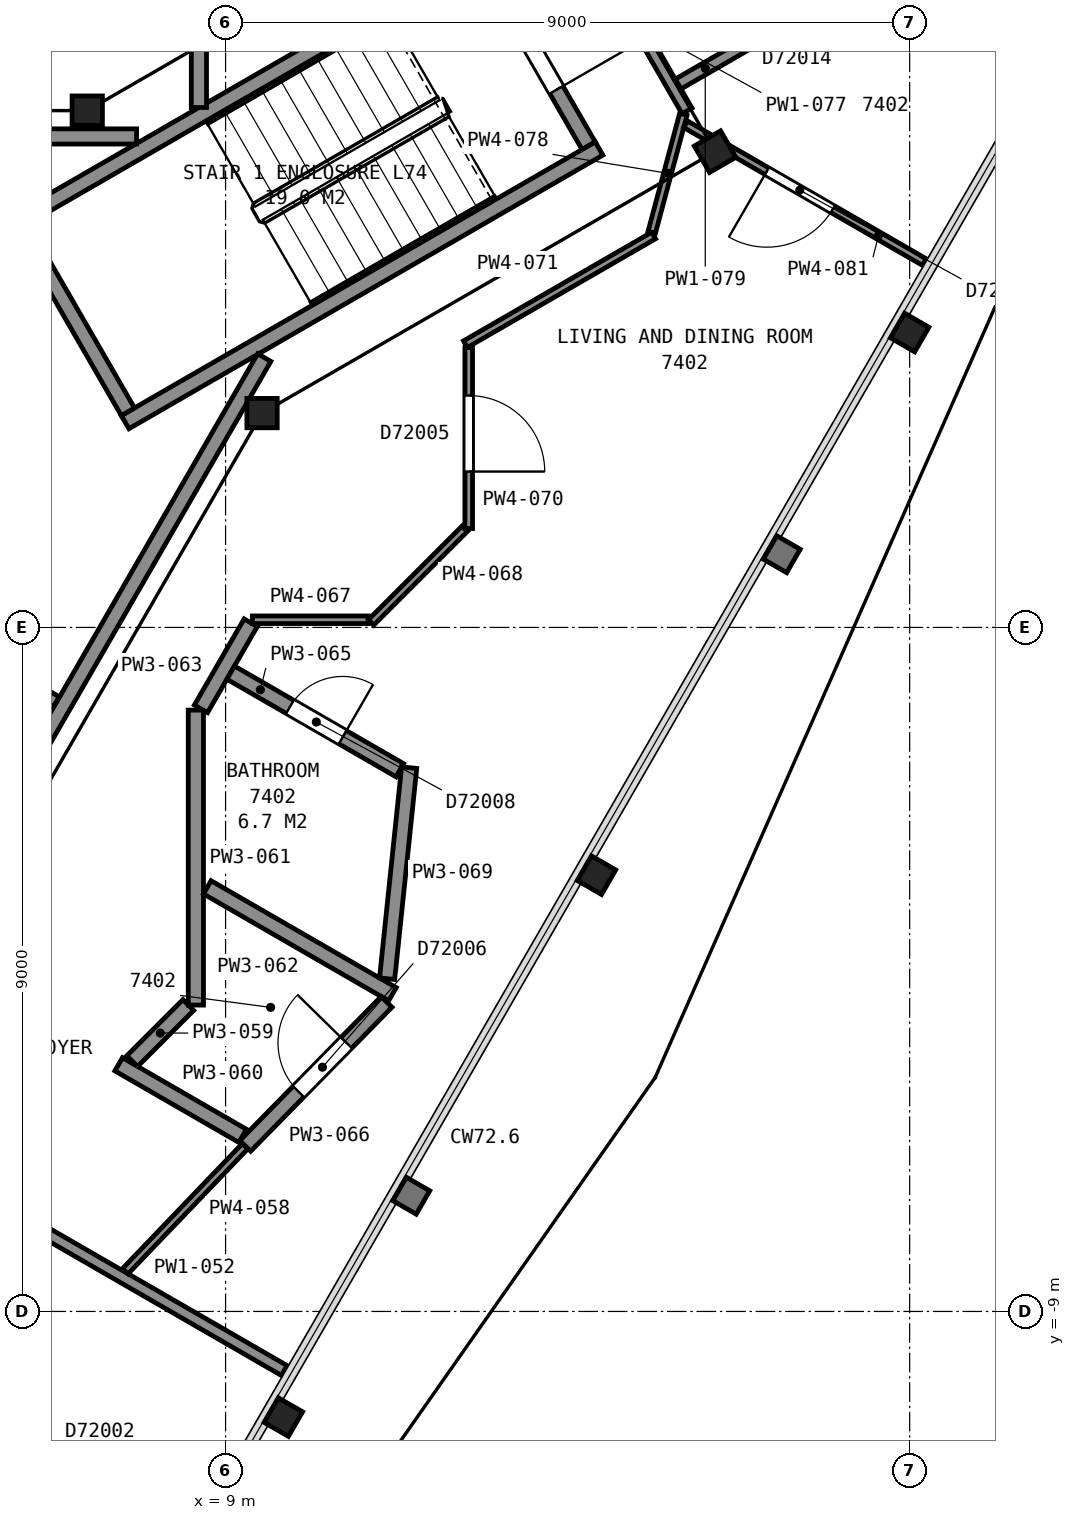
"""IFC4 building model, lengths in metres.
Left out: names, types, materials, properties, quantities, classifications, styles, units other than length and angle.
Written with IfcOpenShell. Run it as: python <this file> out.ifc"""

import sys

from ifc_helpers import new_model, si_unit, direction, frame, frame_2d, origin, origin_2d, place, context, subcontext, project, spatial, rectangle, i_section, extrude, element, fill, save


model = new_model("IFC4")
c1 = context("Model", 3, precision=1e-05, world=origin(), true_north=direction((0.0, 1.0)))
c2 = subcontext(c1, "Body", "Model", "MODEL_VIEW")
j1 = project(units=[si_unit("LENGTHUNIT", "METRE"), si_unit("PLANEANGLEUNIT", "RADIAN")], contexts=[c1])
p1 = place(None, origin())
s1 = spatial("IfcSite", under=j1, at=p1, CompositionType="ELEMENT")
p2 = place(p1, origin())
s2 = spatial("IfcBuilding", under=s1, at=p2, CompositionType="ELEMENT")
p3 = place(p2, frame((0.0, 0.0, 293.6)))
s3 = spatial("IfcBuildingStorey", under=s2, at=p3, CompositionType="ELEMENT", Elevation=293.6)
for number, where, z_axis, x_axis in (
    (1, (9.76, -10.39, 0.0), (0.0, 0.0, 1.0), (-0.5, -0.866, 0.0)),
    (2, (13.88, -3.26, 0.0), (0.0, 0.0, 1.0), (-0.5, -0.866, 0.0)),
    (3, (18.0, 3.88, 0.0), (0.0, 0.0, 1.0), (-0.5, -0.866, 0.0)),
):
    element("IfcColumn", number, at=place(p3, frame(where, z_axis=z_axis, x_axis=x_axis)), inside=s3, PredefinedType="COLUMN", context=c2, shape_type="SweptSolid", body=[
        extrude(i_section(OverallWidth=0.373, OverallDepth=0.368, WebThickness=0.015, FlangeThickness=0.024, FilletRadius=0.015, at=origin_2d()), origin(), (0.0, 0.0, 1.0), 3.7),
    ])
p4 = place(p3, frame((9.48, 2.82, 0.0), z_axis=(0.0, 0.0, 1.0), x_axis=(1.0, 0.0, 0.0)))
e4 = element("IfcColumn", 4, at=p4, inside=s3, PredefinedType="COLUMN", context=c2, shape_type="SweptSolid", body=[
    extrude(i_section(OverallWidth=0.399, OverallDepth=0.386, WebThickness=0.021, FlangeThickness=0.033, FilletRadius=0.015, at=origin_2d()), origin(), (0.0, 0.0, 1.0), 3.7),
])
p5 = place(p3, frame((15.44, 6.26, 0.0), z_axis=(0.0, 0.0, 1.0), x_axis=(0.5, -0.866025403784, 0.0)))
e5 = element("IfcColumn", 5, at=p5, inside=s3, PredefinedType="COLUMN", context=c2, shape_type="SweptSolid", body=[
    extrude(i_section(OverallWidth=0.401, OverallDepth=0.399, WebThickness=0.025, FlangeThickness=0.04, FilletRadius=0.015, at=origin_2d()), origin(), (0.0, 0.0, 1.0), 3.7),
])
p6 = place(p3, frame((7.18, 6.8, 0.0), z_axis=(0.0, 0.0, 1.0), x_axis=(1.0, 0.0, 0.0)))
e6 = element("IfcColumn", 6, at=p6, inside=s3, PredefinedType="COLUMN", context=c2, shape_type="SweptSolid", body=[
    extrude(i_section(OverallWidth=0.399, OverallDepth=0.386, WebThickness=0.021, FlangeThickness=0.033, FilletRadius=0.015, at=origin_2d()), origin(), (0.0, 0.0, 1.0), 3.7),
])
p7 = place(p3, frame((13.777, 6.338, 0.0), z_axis=(0.0, 0.0, 1.0), x_axis=(-0.500049511043, 0.865996816683, 0.0)))
e7 = element("IfcWall", 7, at=p7, inside=s3, PredefinedType="PARTITIONING", context=c2, shape_type="SweptSolid", body=[
    extrude(rectangle(XDim=2.8, YDim=0.2, at=frame_2d((1.4, 0.0))), origin(), (0.0, 0.0, 1.0), 3.45),
])
p8 = place(p7, frame((0.85, 0.0, 0.0)))
e8 = element("IfcOpeningElement", 8, at=p8, cuts=e7, PredefinedType="OPENING", context=c2, shape_type="SweptSolid", body=[
    extrude(rectangle(XDim=1.1, YDim=2.1, at=frame_2d((0.55, 1.05))), frame((0.0, 0.11, 0.0), z_axis=(0.0, -1.0, 0.0), x_axis=(1.0, 0.0, 0.0)), (0.0, 0.0, 1.0), 0.22),
])
for number, where, z_axis, x_axis in (
    (9, (6.178, 5.299, 0.0), (0.0, 0.0, 1.0), (0.866, 0.5, 0.0)),
    (10, (7.678, 2.701, 0.0), (0.0, 0.0, 1.0), (0.866, 0.5, 0.0)),
):
    element("IfcWall", number, at=place(p3, frame(where, z_axis=z_axis, x_axis=x_axis)), inside=s3, PredefinedType="PARTITIONING", context=c2, shape_type="SweptSolid", body=[
        extrude(rectangle(XDim=7.2, YDim=0.2, at=frame_2d((3.6, 0.0))), origin(), (0.0, 0.0, 1.0), 3.45),
    ])
p9 = place(p3, frame((7.715, 2.838, 0.0), z_axis=(0.0, 0.0, 1.0), x_axis=(-0.500049511043, 0.865996816683, 0.0)))
e11 = element("IfcWall", 11, at=p9, inside=s3, PredefinedType="PARTITIONING", context=c2, shape_type="SweptSolid", body=[
    extrude(rectangle(XDim=2.8, YDim=0.2, at=frame_2d((1.4, 0.0))), origin(), (0.0, 0.0, 1.0), 3.45),
])
p10 = place(p3, frame((7.829, 6.46, 0.0), z_axis=(0.0, 0.0, 1.0), x_axis=(-1.0, 0.0, 0.0)))
e12 = element("IfcWall", 12, at=p10, inside=s3, PredefinedType="PARTITIONING", context=c2, shape_type="SweptSolid", body=[
    extrude(rectangle(XDim=15.658, YDim=0.2, at=frame_2d((7.829, 0.0))), origin(), (0.0, 0.0, 1.0), 3.45),
])
p11 = place(p10, frame((12.168, 0.0, 0.0)))
e13 = element("IfcOpeningElement", 13, at=p11, cuts=e12, PredefinedType="OPENING", context=c2, shape_type="SweptSolid", body=[
    extrude(rectangle(XDim=1.2, YDim=2.1, at=frame_2d((0.6, 1.05))), frame((0.0, 0.11, 0.0), z_axis=(0.0, -1.0, 0.0), x_axis=(1.0, 0.0, 0.0)), (0.0, 0.0, 1.0), 0.22),
])
p12 = place(p3, frame((3.828, -6.29, 0.0), z_axis=(0.0, 0.0, 1.0), x_axis=(0.499979739078, 0.866037101117, 0.0)))
e14 = element("IfcWall", 14, at=p12, inside=s3, PredefinedType="PARTITIONING", context=c2, shape_type="SweptSolid", body=[
    extrude(rectangle(XDim=11.363, YDim=0.2, at=frame_2d((5.681, 0.0))), origin(), (0.0, 0.0, 1.0), 3.45),
])
p13 = place(p12, frame((0.55, 0.0, 0.0)))
e15 = element("IfcOpeningElement", 15, at=p13, cuts=e14, PredefinedType="OPENING", context=c2, shape_type="SweptSolid", body=[
    extrude(rectangle(XDim=1.2, YDim=2.1, at=frame_2d((0.6, 1.05))), frame((0.0, 0.11, 0.0), z_axis=(0.0, -1.0, 0.0), x_axis=(1.0, 0.0, 0.0)), (0.0, 0.0, 1.0), 0.22),
])
p14 = place(p3, frame((6.774, -0.978, 0.0), z_axis=(0.0, 0.0, 1.0), x_axis=(-0.866062920605, 0.499935013329, 0.0)))
e16 = element("IfcWall", 16, at=p14, inside=s3, PredefinedType="PARTITIONING", context=c2, shape_type="SweptSolid", body=[
    extrude(rectangle(XDim=2.22, YDim=0.15, at=frame_2d((1.11, 0.0))), origin(), (0.0, 0.0, 1.0), 3.45),
])
p15 = place(p14, frame((0.646, 0.0, 0.0)))
e17 = element("IfcOpeningElement", 17, at=p15, cuts=e16, PredefinedType="OPENING", context=c2, shape_type="SweptSolid", body=[
    extrude(rectangle(XDim=0.9, YDim=2.1, at=frame_2d((0.45, 1.05))), frame((0.0, 0.085, 0.0), z_axis=(0.0, -1.0, 0.0), x_axis=(1.0, 0.0, 0.0)), (0.0, 0.0, 1.0), 0.17),
])
p16 = place(p3, frame((3.682, -9.495, 0.0), z_axis=(0.0, 0.0, 1.0), x_axis=(0.866046690806, -0.499963127985, 0.0)))
e18 = element("IfcWall", 18, at=p16, inside=s3, PredefinedType="PARTITIONING", context=c2, shape_type="SweptSolid", body=[
    extrude(rectangle(XDim=3.454, YDim=0.2, at=frame_2d((1.727, 0.0))), origin(), (0.0, 0.0, 1.0), 2.723),
])
p17 = place(p3, frame((9.772, -9.777, 0.0), z_axis=(0.0, 0.0, 1.0), x_axis=(-0.866083818164, 0.499898809675, 0.0)))
e19 = element("IfcWall", 19, at=p17, inside=s3, PredefinedType="PARTITIONING", context=c2, shape_type="SweptSolid", body=[
    extrude(rectangle(XDim=6.551, YDim=0.15, at=frame_2d((3.275, 0.0))), origin(), (0.0, 0.0, 1.0), 2.723),
])
p18 = place(p17, frame((4.001, 0.0, 0.0)))
e20 = element("IfcOpeningElement", 20, at=p18, cuts=e19, PredefinedType="OPENING", context=c2, shape_type="SweptSolid", body=[
    extrude(rectangle(XDim=1.0, YDim=2.1, at=frame_2d((0.5, 1.05))), frame((0.0, 0.085, 0.0), z_axis=(0.0, -1.0, 0.0), x_axis=(1.0, 0.0, 0.0)), (0.0, 0.0, 1.0), 0.17),
])
p19 = place(p3, frame((7.681, -8.47, 0.0), z_axis=(0.0, 0.0, 1.0), x_axis=(0.691774963189, 0.722113149239, 0.0)))
e21 = element("IfcWall", 21, at=p19, inside=s3, PredefinedType="PARTITIONING", context=c2, shape_type="SweptSolid", body=[
    extrude(rectangle(XDim=2.277, YDim=0.1, at=frame_2d((1.139, 0.0))), origin(), (0.0, 0.0, 1.0), 2.723),
])
p20 = place(p3, frame((7.772, -5.706, 0.0), z_axis=(0.0, 0.0, 1.0), x_axis=(0.707106781187, 0.707106781187, 0.0)))
e22 = element("IfcWall", 22, at=p20, inside=s3, PredefinedType="PARTITIONING", context=c2, shape_type="SweptSolid", body=[
    extrude(rectangle(XDim=1.044, YDim=0.2, at=frame_2d((0.522, 0.0))), origin(), (0.0, 0.0, 1.0), 2.723),
])
p21 = place(p3, frame((7.594, -5.748, 0.0), z_axis=(0.0, 0.0, 1.0), x_axis=(0.866049635583, -0.499958026946, 0.0)))
e23 = element("IfcWall", 23, at=p21, inside=s3, PredefinedType="PARTITIONING", context=c2, shape_type="SweptSolid", body=[
    extrude(rectangle(XDim=1.884, YDim=0.2, at=frame_2d((0.942, 0.0))), origin(), (0.0, 0.0, 1.0), 2.723),
])
p22 = place(p3, frame((8.609, -4.969, 0.0), z_axis=(0.0, 0.0, 1.0), x_axis=(0.0, 1.0, 0.0)))
e24 = element("IfcWall", 24, at=p22, inside=s3, PredefinedType="PARTITIONING", context=c2, shape_type="SweptSolid", body=[
    extrude(rectangle(XDim=3.881, YDim=0.2, at=frame_2d((1.94, 0.0))), origin(), (0.0, 0.0, 1.0), 2.723),
])
p23 = place(p3, frame((8.759, -3.42, 0.0), z_axis=(0.0, 0.0, 1.0), x_axis=(0.866098885879, -0.499872703674, 0.0)))
e25 = element("IfcWall", 25, at=p23, inside=s3, PredefinedType="PARTITIONING", context=c2, shape_type="SweptSolid", body=[
    extrude(rectangle(XDim=2.813, YDim=0.2, at=frame_2d((1.407, 0.0))), origin(), (0.0, 0.0, 1.0), 2.723),
])
p24 = place(p3, frame((8.677, -1.071, 0.0), z_axis=(0.0, 0.0, 1.0), x_axis=(0.49993245451, 0.866064397679, 0.0)))
e26 = element("IfcWall", 26, at=p24, inside=s3, PredefinedType="PARTITIONING", context=c2, shape_type="SweptSolid", body=[
    extrude(rectangle(XDim=1.308, YDim=0.2, at=frame_2d((0.654, 0.0))), origin(), (0.0, 0.0, 1.0), 2.723),
])
p25 = place(p3, frame((8.649, 6.841, 0.0), z_axis=(0.0, 0.0, 1.0), x_axis=(0.0, 1.0, 0.0)))
e27 = element("IfcWall", 27, at=p25, inside=s3, PredefinedType="PARTITIONING", context=c2, shape_type="SweptSolid", body=[
    extrude(rectangle(XDim=1.528, YDim=0.2, at=frame_2d((0.764, 0.0))), origin(), (0.0, 0.0, 1.0), 2.723),
])
p26 = place(p3, frame((11.292, -1.879, 0.0), z_axis=(0.0, 0.0, 1.0), x_axis=(-0.866123870273, 0.499829412243, 0.0)))
e28 = element("IfcWall", 28, at=p26, inside=s3, PredefinedType="PARTITIONING", context=c2, shape_type="SweptSolid", body=[
    extrude(rectangle(XDim=2.569, YDim=0.2, at=frame_2d((1.284, 0.0))), origin(), (0.0, 0.0, 1.0), 2.723),
])
p27 = place(p26, frame((0.869, 0.0, 0.0)))
e29 = element("IfcOpeningElement", 29, at=p27, cuts=e28, PredefinedType="OPENING", context=c2, shape_type="SweptSolid", body=[
    extrude(rectangle(XDim=0.8, YDim=2.1, at=frame_2d((0.4, 1.05))), frame((0.0, 0.11, 0.0), z_axis=(0.0, -1.0, 0.0), x_axis=(1.0, 0.0, 0.0)), (0.0, 0.0, 1.0), 0.22),
])
p28 = place(p3, frame((9.259, -6.821, 0.0), z_axis=(0.0, 0.0, 1.0), x_axis=(0.700360124324, 0.713789672282, 0.0)))
e30 = element("IfcWall", 30, at=p28, inside=s3, PredefinedType="PARTITIONING", context=c2, shape_type="SweptSolid", body=[
    extrude(rectangle(XDim=2.654, YDim=0.2, at=frame_2d((1.327, 0.0))), origin(), (0.0, 0.0, 1.0), 2.723),
])
p29 = place(p28, frame((1.0, 0.0, 0.0)))
e31 = element("IfcOpeningElement", 31, at=p29, cuts=e30, PredefinedType="OPENING", context=c2, shape_type="SweptSolid", body=[
    extrude(rectangle(XDim=0.9, YDim=2.1, at=frame_2d((0.45, 1.05))), frame((0.0, 0.11, 0.0), z_axis=(0.0, -1.0, 0.0), x_axis=(1.0, 0.0, 0.0)), (0.0, 0.0, 1.0), 0.22),
])
p30 = place(p3, frame((9.353, 0.101, 0.0), z_axis=(0.0, 0.0, 1.0), x_axis=(1.0, 0.0, 0.0)))
e32 = element("IfcWall", 32, at=p30, inside=s3, PredefinedType="PARTITIONING", context=c2, shape_type="SweptSolid", body=[
    extrude(rectangle(XDim=1.526, YDim=0.1, at=frame_2d((0.763, 0.0))), origin(), (0.0, 0.0, 1.0), 2.723),
])
p31 = place(p3, frame((10.914, 0.066, 0.0), z_axis=(0.0, 0.0, 1.0), x_axis=(0.707106781187, 0.707106781187, 0.0)))
e33 = element("IfcWall", 33, at=p31, inside=s3, PredefinedType="PARTITIONING", context=c2, shape_type="SweptSolid", body=[
    extrude(rectangle(XDim=1.748, YDim=0.1, at=frame_2d((0.874, 0.0))), origin(), (0.0, 0.0, 1.0), 2.723),
])
p32 = place(p3, frame((11.125, -4.622, 0.0), z_axis=(0.0, 0.0, 1.0), x_axis=(0.103952036587, 0.99458231137, 0.0)))
e34 = element("IfcWall", 34, at=p32, inside=s3, PredefinedType="PARTITIONING", context=c2, shape_type="SweptSolid", body=[
    extrude(rectangle(XDim=2.792, YDim=0.2, at=frame_2d((1.396, 0.0))), origin(), (0.0, 0.0, 1.0), 2.723),
])
p33 = place(p3, frame((12.199, 3.682, 0.0), z_axis=(0.0, 0.0, 1.0), x_axis=(0.0, -1.0, 0.0)))
e35 = element("IfcWall", 35, at=p33, inside=s3, PredefinedType="PARTITIONING", context=c2, shape_type="SweptSolid", body=[
    extrude(rectangle(XDim=2.381, YDim=0.1, at=frame_2d((1.19, 0.0))), origin(), (0.0, 0.0, 1.0), 2.723),
])
p34 = place(p33, frame((0.631, 0.0, 0.0)))
e36 = element("IfcOpeningElement", 36, at=p34, cuts=e35, PredefinedType="OPENING", context=c2, shape_type="SweptSolid", body=[
    extrude(rectangle(XDim=1.0, YDim=2.1, at=frame_2d((0.5, 1.05))), frame((0.0, 0.06, 0.0), z_axis=(0.0, -1.0, 0.0), x_axis=(1.0, 0.0, 0.0)), (0.0, 0.0, 1.0), 0.12),
])
p35 = place(p3, frame((12.156, 3.727, 0.0), z_axis=(0.0, 0.0, 1.0), x_axis=(0.866012137121, 0.500022977831, 0.0)))
e37 = element("IfcWall", 37, at=p35, inside=s3, PredefinedType="PARTITIONING", context=c2, shape_type="SweptSolid", body=[
    extrude(rectangle(XDim=2.86, YDim=0.1, at=frame_2d((1.43, 0.0))), origin(), (0.0, 0.0, 1.0), 2.723),
])
p36 = place(p3, frame((13.759, 9.069, 0.0), z_axis=(0.0, 0.0, 1.0), x_axis=(0.500020344131, -0.866013657776, 0.0)))
e38 = element("IfcWall", 38, at=p36, inside=s3, PredefinedType="PARTITIONING", context=c2, shape_type="SweptSolid", body=[
    extrude(rectangle(XDim=2.625, YDim=0.15, at=frame_2d((1.312, 0.0))), origin(), (0.0, 0.0, 1.0), 2.723),
])
p37 = place(p3, frame((14.607, 5.2, 0.0), z_axis=(0.0, 0.0, 1.0), x_axis=(0.258589257768, 0.965987368327, 0.0)))
e39 = element("IfcWall", 39, at=p37, inside=s3, PredefinedType="PARTITIONING", context=c2, shape_type="SweptSolid", body=[
    extrude(rectangle(XDim=1.607, YDim=0.1, at=frame_2d((0.803, 0.0))), origin(), (0.0, 0.0, 1.0), 2.723),
])
p38 = place(p3, frame((14.954, 7.149, 0.0), z_axis=(0.0, 0.0, 1.0), x_axis=(0.865960792519, 0.5001118933, 0.0)))
e40 = element("IfcWall", 40, at=p38, inside=s3, PredefinedType="PARTITIONING", context=c2, shape_type="SweptSolid", body=[
    extrude(rectangle(XDim=1.375, YDim=0.15, at=frame_2d((0.688, 0.0))), origin(), (0.0, 0.0, 1.0), 2.723),
])
p39 = place(p3, frame((15.052, 6.62, 0.0), z_axis=(0.0, 0.0, 1.0), x_axis=(0.866029693906, -0.499992569217, 0.0)))
e41 = element("IfcWall", 41, at=p39, inside=s3, PredefinedType="PARTITIONING", context=c2, shape_type="SweptSolid", body=[
    extrude(rectangle(XDim=3.625, YDim=0.1, at=frame_2d((1.812, 0.0))), origin(), (0.0, 0.0, 1.0), 2.723),
])
p40 = place(p39, frame((1.235, 0.0, 0.0)))
e42 = element("IfcOpeningElement", 42, at=p40, cuts=e41, PredefinedType="OPENING", context=c2, shape_type="SweptSolid", body=[
    extrude(rectangle(XDim=1.0, YDim=2.1, at=frame_2d((0.5, 1.05))), frame((0.0, 0.06, 0.0), z_axis=(0.0, -1.0, 0.0), x_axis=(1.0, 0.0, 0.0)), (0.0, 0.0, 1.0), 0.12),
])
p41 = place(p8, origin())
e43 = element("IfcDoor", 43, at=p41, inside=s3, OperationType="SINGLE_SWING_LEFT", PredefinedType="DOOR", context=c2, shape_type="SweptSolid", body=[
    extrude(rectangle(XDim=1.1, YDim=2.1, at=frame_2d((0.55, 1.05))), frame((0.0, 0.025, 0.0), z_axis=(0.0, -1.0, 0.0), x_axis=(1.0, 0.0, 0.0)), (0.0, 0.0, 1.0), 0.05),
])
fill(e8, e43)
p42 = place(p27, origin())
e44 = element("IfcDoor", 44, at=p42, inside=s3, OperationType="SINGLE_SWING_LEFT", PredefinedType="DOOR", context=c2, shape_type="SweptSolid", body=[
    extrude(rectangle(XDim=0.8, YDim=2.1, at=frame_2d((0.4, 1.05))), frame((0.0, 0.025, 0.0), z_axis=(0.0, -1.0, 0.0), x_axis=(1.0, 0.0, 0.0)), (0.0, 0.0, 1.0), 0.05),
])
fill(e29, e44)
p43 = place(p29, origin())
e45 = element("IfcDoor", 45, at=p43, inside=s3, OperationType="SINGLE_SWING_RIGHT", PredefinedType="DOOR", context=c2, shape_type="SweptSolid", body=[
    extrude(rectangle(XDim=0.9, YDim=2.1, at=frame_2d((0.45, 1.05))), frame((0.0, 0.025, 0.0), z_axis=(0.0, -1.0, 0.0), x_axis=(1.0, 0.0, 0.0)), (0.0, 0.0, 1.0), 0.05),
])
fill(e31, e45)
p44 = place(p34, origin())
e46 = element("IfcDoor", 46, at=p44, inside=s3, OperationType="SINGLE_SWING_RIGHT", PredefinedType="DOOR", context=c2, shape_type="SweptSolid", body=[
    extrude(rectangle(XDim=1.0, YDim=2.1, at=frame_2d((0.5, 1.05))), frame((0.0, 0.025, 0.0), z_axis=(0.0, -1.0, 0.0), x_axis=(1.0, 0.0, 0.0)), (0.0, 0.0, 1.0), 0.05),
])
fill(e36, e46)
p45 = place(p40, origin())
e47 = element("IfcDoor", 47, at=p45, inside=s3, OperationType="SINGLE_SWING_LEFT", PredefinedType="DOOR", context=c2, shape_type="SweptSolid", body=[
    extrude(rectangle(XDim=1.0, YDim=2.1, at=frame_2d((0.5, 1.05))), frame((0.0, 0.025, 0.0), z_axis=(0.0, -1.0, 0.0), x_axis=(1.0, 0.0, 0.0)), (0.0, 0.0, 1.0), 0.05),
])
fill(e42, e47)
save(model, sys.argv[1])
